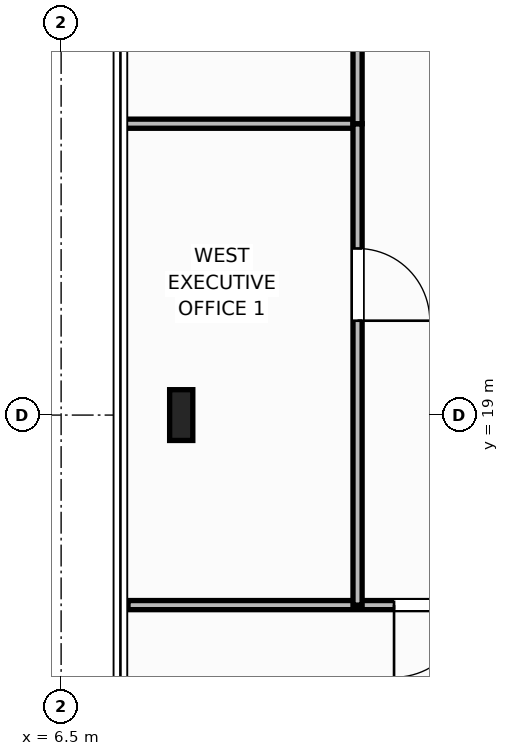
"""IFC4 building model, lengths in metres.
Left out: names, types, materials, properties, quantities, classifications, styles, units other than length and angle.
Written with IfcOpenShell. Run it as: python <this file> out.ifc"""

import sys

from ifc_helpers import new_model, si_unit, direction, frame, frame_2d, origin, origin_2d, place, context, subcontext, project, spatial, rectangle, i_section, extrude, element, fill, save


model = new_model("IFC4")
c1 = context("Model", 3, precision=1e-05, world=origin(), true_north=direction((0.0, 1.0)))
c2 = subcontext(c1, "Body", "Model", "MODEL_VIEW")
j1 = project(units=[si_unit("LENGTHUNIT", "METRE"), si_unit("PLANEANGLEUNIT", "RADIAN")], contexts=[c1])
p1 = place(None, origin())
s1 = spatial("IfcSite", under=j1, at=p1, CompositionType="ELEMENT")
p2 = place(p1, origin())
s2 = spatial("IfcBuilding", under=s1, at=p2, CompositionType="ELEMENT")
p3 = place(p2, frame((0.0, 0.0, 294.4)))
s3 = spatial("IfcBuildingStorey", under=s2, at=p3, CompositionType="ELEMENT", Elevation=294.4)
p4 = place(p3, frame((8.08, 19.0, 0.0), z_axis=(0.0, 0.0, 1.0), x_axis=(1.0, 0.0, 0.0)))
e1 = element("IfcColumn", 1, at=p4, inside=s3, PredefinedType="COLUMN", context=c2, shape_type="SweptSolid", body=[
    extrude(i_section(OverallWidth=0.305, OverallDepth=0.668, WebThickness=0.021, FlangeThickness=0.04, at=origin_2d()), origin(), (0.0, 0.0, 1.0), 4.0),
])
p5 = place(p3, frame((7.38, 16.5, 0.0), z_axis=(0.0, 0.0, 1.0), x_axis=(1.0, 0.0, 0.0)))
e2 = element("IfcWall", 2, at=p5, inside=s3, PredefinedType="PARTITIONING", context=c2, shape_type="SweptSolid", body=[
    extrude(rectangle(XDim=6.734, YDim=0.12, at=frame_2d((3.367, 0.0))), origin(), (0.0, 0.0, 1.0), 3.788),
])
p6 = place(p5, frame((3.5, 0.0, 0.0)))
e3 = element("IfcOpeningElement", 3, at=p6, cuts=e2, PredefinedType="OPENING", context=c2, shape_type="SweptSolid", body=[
    extrude(rectangle(XDim=0.95, YDim=2.15, at=frame_2d((0.475, 1.075))), frame((0.0, 0.07, 0.0), z_axis=(0.0, -1.0, 0.0), x_axis=(1.0, 0.0, 0.0)), (0.0, 0.0, 1.0), 0.14),
])
p7 = place(p3, frame((7.22, 22.833, 0.0), z_axis=(0.0, 0.0, 1.0), x_axis=(1.0, 0.0, 0.0)))
e4 = element("IfcWall", 4, at=p7, inside=s3, PredefinedType="PARTITIONING", context=c2, shape_type="SweptSolid", body=[
    extrude(rectangle(XDim=3.18, YDim=0.12, at=frame_2d((1.59, 0.0))), origin(), (0.0, 0.0, 1.0), 3.788),
])
p8 = place(p3, frame((10.4, 16.5, 0.0), z_axis=(0.0, 0.0, 1.0), x_axis=(0.0, 1.0, 0.0)))
e5 = element("IfcWall", 5, at=p8, inside=s3, PredefinedType="PARTITIONING", context=c2, shape_type="SweptSolid", body=[
    extrude(rectangle(XDim=6.333, YDim=0.12, at=frame_2d((3.167, 0.0))), origin(), (0.0, 0.0, 1.0), 3.788),
])
p9 = place(p8, frame((3.742, 0.0, 0.0)))
e6 = element("IfcOpeningElement", 6, at=p9, cuts=e5, PredefinedType="OPENING", context=c2, shape_type="SweptSolid", body=[
    extrude(rectangle(XDim=0.95, YDim=2.15, at=frame_2d((0.475, 1.075))), frame((0.0, 0.07, 0.0), z_axis=(0.0, -1.0, 0.0), x_axis=(1.0, 0.0, 0.0)), (0.0, 0.0, 1.0), 0.14),
])
p10 = place(p3, frame((10.4, 22.833, 0.0), z_axis=(0.0, 0.0, 1.0), x_axis=(0.0, 1.0, 0.0)))
e7 = element("IfcWall", 7, at=p10, inside=s3, PredefinedType="PARTITIONING", context=c2, shape_type="SweptSolid", body=[
    extrude(rectangle(XDim=6.333, YDim=0.12, at=frame_2d((3.167, 0.0))), origin(), (0.0, 0.0, 1.0), 3.788),
])
p11 = place(p10, frame((2.692, 0.0, 0.0)))
e8 = element("IfcOpeningElement", 8, at=p11, cuts=e7, PredefinedType="OPENING", context=c2, shape_type="SweptSolid", body=[
    extrude(rectangle(XDim=0.95, YDim=2.15, at=frame_2d((0.475, 1.075))), frame((0.0, 0.07, 0.0), z_axis=(0.0, -1.0, 0.0), x_axis=(1.0, 0.0, 0.0)), (0.0, 0.0, 1.0), 0.14),
])
p12 = place(p6, origin())
e9 = element("IfcDoor", 9, at=p12, inside=s3, OperationType="SINGLE_SWING_RIGHT", PredefinedType="DOOR", context=c2, shape_type="SweptSolid", body=[
    extrude(rectangle(XDim=0.95, YDim=2.15, at=frame_2d((0.475, 1.075))), frame((0.0, 0.025, 0.0), z_axis=(0.0, -1.0, 0.0), x_axis=(1.0, 0.0, 0.0)), (0.0, 0.0, 1.0), 0.05),
])
fill(e3, e9)
p13 = place(p9, origin())
e10 = element("IfcDoor", 10, at=p13, inside=s3, OperationType="SINGLE_SWING_RIGHT", PredefinedType="DOOR", context=c2, shape_type="SweptSolid", body=[
    extrude(rectangle(XDim=0.95, YDim=2.15, at=frame_2d((0.475, 1.075))), frame((0.0, 0.025, 0.0), z_axis=(0.0, -1.0, 0.0), x_axis=(1.0, 0.0, 0.0)), (0.0, 0.0, 1.0), 0.05),
])
fill(e6, e10)
save(model, sys.argv[1])
